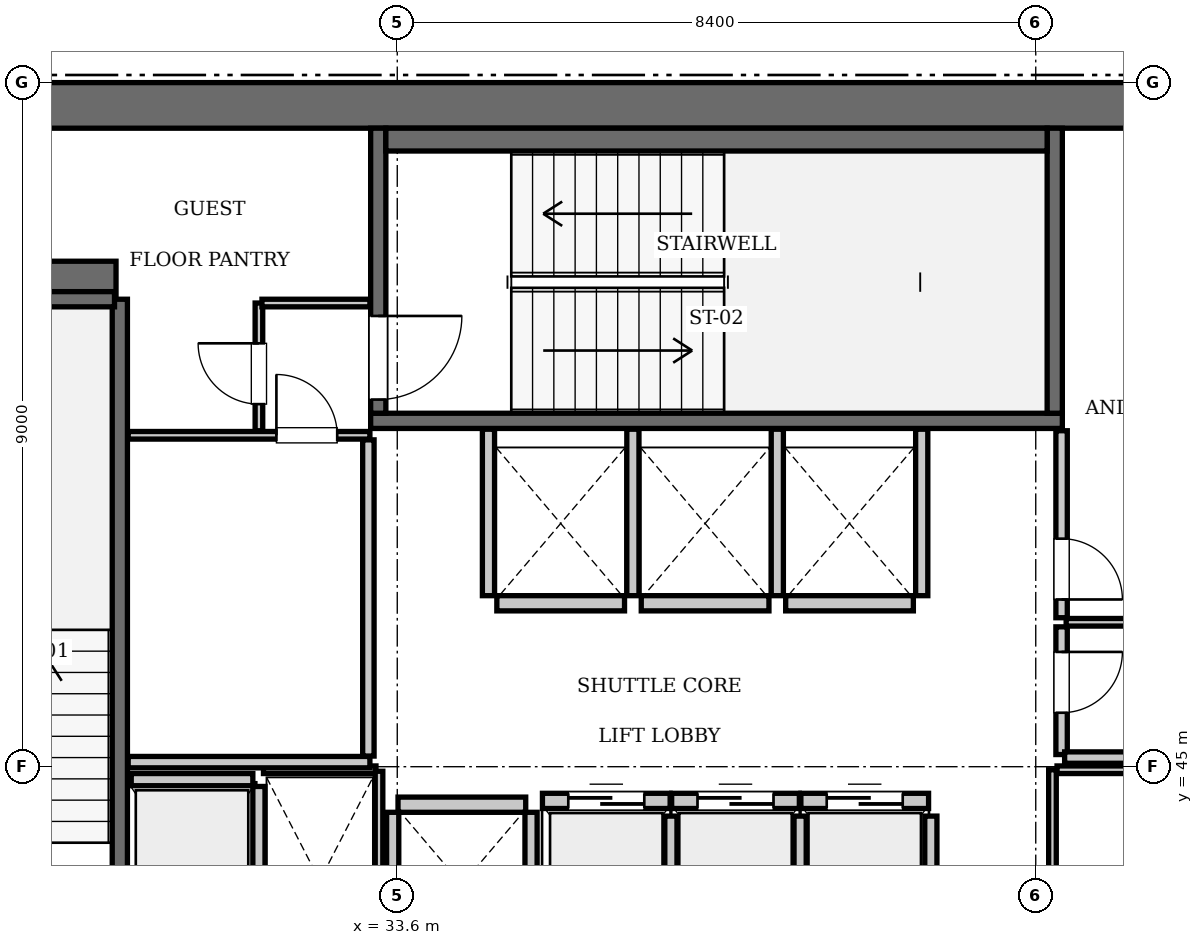
"""IFC4 building model, lengths in metres.
Left out: names, types, materials, properties, quantities, classifications, styles, units other than length and angle.
Written with IfcOpenShell. Run it as: python <this file> out.ifc"""

import sys

from ifc_helpers import new_model, si_unit, direction, frame, frame_2d, origin, place, context, subcontext, project, spatial, rectangle, extrude, element, fill, save


model = new_model("IFC4")
c1 = context("Model", 3, precision=1e-05, world=origin(), true_north=direction((0.0, 1.0)))
c2 = subcontext(c1, "Body", "Model", "MODEL_VIEW")
j1 = project(units=[si_unit("LENGTHUNIT", "METRE"), si_unit("PLANEANGLEUNIT", "RADIAN")], contexts=[c1])
p1 = place(None, origin())
s1 = spatial("IfcSite", under=j1, at=p1, CompositionType="ELEMENT")
p2 = place(p1, origin())
s2 = spatial("IfcBuilding", under=s1, at=p2, CompositionType="ELEMENT")
p3 = place(p2, frame((0.0, 0.0, 250.95)))
s3 = spatial("IfcBuildingStorey", under=s2, at=p3, CompositionType="ELEMENT", Elevation=250.95)
p4 = place(p3, frame((25.2, 53.7, 0.0), z_axis=(0.0, 0.0, 1.0), x_axis=(1.0, 0.0, 0.0)))
e1 = element("IfcWall", 1, at=p4, inside=s3, PredefinedType="SHEAR", context=c2, shape_type="SweptSolid", body=[
    extrude(rectangle(XDim=25.2, YDim=0.6, at=frame_2d((12.6, 0.0))), origin(), (0.0, 0.0, 1.0), 3.85),
])
p5 = place(p3, frame((25.8, 51.4, 0.0), z_axis=(0.0, 0.0, 1.0), x_axis=(1.0, 0.0, 0.0)))
e2 = element("IfcWall", 2, at=p5, inside=s3, PredefinedType="SHEAR", context=c2, shape_type="SweptSolid", body=[
    extrude(rectangle(XDim=4.1, YDim=0.5, at=frame_2d((2.05, 0.0))), origin(), (0.0, 0.0, 1.0), 3.85),
])
p6 = place(p3, frame((29.95, 42.0, 0.0), z_axis=(0.0, 0.0, 1.0), x_axis=(0.0, 1.0, 0.0)))
e3 = element("IfcWall", 3, at=p6, inside=s3, PredefinedType="SOLIDWALL", context=c2, shape_type="SweptSolid", body=[
    extrude(rectangle(XDim=9.15, YDim=0.2, at=frame_2d((4.575, 0.0))), origin(), (0.0, 0.0, 1.0), 3.61),
])
p7 = place(p3, frame((26.38, 51.15, 0.0), z_axis=(0.0, 0.0, 1.0), x_axis=(1.0, 0.0, 0.0)))
e4 = element("IfcWall", 4, at=p7, inside=s3, PredefinedType="SOLIDWALL", context=c2, shape_type="SweptSolid", body=[
    extrude(rectangle(XDim=3.5, YDim=0.2, at=frame_2d((1.75, 0.0))), origin(), (0.0, 0.0, 1.0), 3.61),
])
p8 = place(p3, frame((33.25, 49.55, 0.0), z_axis=(0.0, 0.0, 1.0), x_axis=(1.0, 0.0, 0.0)))
e5 = element("IfcWall", 5, at=p8, inside=s3, PredefinedType="SOLIDWALL", context=c2, shape_type="SweptSolid", body=[
    extrude(rectangle(XDim=9.1, YDim=0.2, at=frame_2d((4.55, 0.0))), origin(), (0.0, 0.0, 1.0), 3.61),
])
p9 = place(p3, frame((42.25, 49.65, 0.0), z_axis=(0.0, 0.0, 1.0), x_axis=(0.0, 1.0, 0.0)))
e6 = element("IfcWall", 6, at=p9, inside=s3, PredefinedType="SOLIDWALL", context=c2, shape_type="SweptSolid", body=[
    extrude(rectangle(XDim=3.75, YDim=0.2, at=frame_2d((1.875, 0.0))), origin(), (0.0, 0.0, 1.0), 3.61),
])
p10 = place(p3, frame((33.35, 49.65, 0.0), z_axis=(0.0, 0.0, 1.0), x_axis=(0.0, 1.0, 0.0)))
e7 = element("IfcWall", 7, at=p10, inside=s3, PredefinedType="SOLIDWALL", context=c2, shape_type="SweptSolid", body=[
    extrude(rectangle(XDim=3.75, YDim=0.2, at=frame_2d((1.875, 0.0))), origin(), (0.0, 0.0, 1.0), 3.61),
])
p11 = place(p10, frame((0.18, 0.0, 0.0)))
e8 = element("IfcOpeningElement", 8, at=p11, cuts=e7, PredefinedType="OPENING", context=c2, shape_type="SweptSolid", body=[
    extrude(rectangle(XDim=1.1, YDim=2.15, at=frame_2d((0.55, 1.075))), frame((0.0, 0.11, 0.0), z_axis=(0.0, -1.0, 0.0), x_axis=(1.0, 0.0, 0.0)), (0.0, 0.0, 1.0), 0.22),
])
p12 = place(p3, frame((33.45, 53.25, 0.0), z_axis=(0.0, 0.0, 1.0), x_axis=(1.0, 0.0, 0.0)))
e9 = element("IfcWall", 9, at=p12, inside=s3, PredefinedType="SOLIDWALL", context=c2, shape_type="SweptSolid", body=[
    extrude(rectangle(XDim=8.7, YDim=0.3, at=frame_2d((4.35, 0.0))), origin(), (0.0, 0.0, 1.0), 3.61),
])
p13 = place(p3, frame((35.51, 44.55, 0.0), z_axis=(0.0, 0.0, 1.0), x_axis=(1.0, 0.0, 0.0)))
e10 = element("IfcWall", 10, at=p13, inside=s3, PredefinedType="SOLIDWALL", context=c2, shape_type="SweptSolid", body=[
    extrude(rectangle(XDim=1.68, YDim=0.2, at=frame_2d((0.84, 0.0))), origin(), (0.0, 0.0, 1.0), 3.61),
])
p14 = place(p13, frame((0.34, 0.0, 0.0)))
e11 = element("IfcOpeningElement", 11, at=p14, cuts=e10, PredefinedType="OPENING", context=c2, shape_type="SweptSolid", body=[
    extrude(rectangle(XDim=1.0, YDim=2.15, at=frame_2d((0.5, 1.075))), frame((0.0, 0.11, 0.0), z_axis=(0.0, -1.0, 0.0), x_axis=(1.0, 0.0, 0.0)), (0.0, 0.0, 1.0), 0.22),
])
p15 = place(p3, frame((37.21, 44.55, 0.0), z_axis=(0.0, 0.0, 1.0), x_axis=(1.0, 0.0, 0.0)))
e12 = element("IfcWall", 12, at=p15, inside=s3, PredefinedType="SOLIDWALL", context=c2, shape_type="SweptSolid", body=[
    extrude(rectangle(XDim=1.68, YDim=0.2, at=frame_2d((0.84, 0.0))), origin(), (0.0, 0.0, 1.0), 3.61),
])
p16 = place(p15, frame((0.34, 0.0, 0.0)))
e13 = element("IfcOpeningElement", 13, at=p16, cuts=e12, PredefinedType="OPENING", context=c2, shape_type="SweptSolid", body=[
    extrude(rectangle(XDim=1.0, YDim=2.15, at=frame_2d((0.5, 1.075))), frame((0.0, 0.11, 0.0), z_axis=(0.0, -1.0, 0.0), x_axis=(1.0, 0.0, 0.0)), (0.0, 0.0, 1.0), 0.22),
])
p17 = place(p3, frame((38.91, 44.55, 0.0), z_axis=(0.0, 0.0, 1.0), x_axis=(1.0, 0.0, 0.0)))
e14 = element("IfcWall", 14, at=p17, inside=s3, PredefinedType="SOLIDWALL", context=c2, shape_type="SweptSolid", body=[
    extrude(rectangle(XDim=1.68, YDim=0.2, at=frame_2d((0.84, 0.0))), origin(), (0.0, 0.0, 1.0), 3.61),
])
p18 = place(p17, frame((0.34, 0.0, 0.0)))
e15 = element("IfcOpeningElement", 15, at=p18, cuts=e14, PredefinedType="OPENING", context=c2, shape_type="SweptSolid", body=[
    extrude(rectangle(XDim=1.0, YDim=2.15, at=frame_2d((0.5, 1.075))), frame((0.0, 0.11, 0.0), z_axis=(0.0, -1.0, 0.0), x_axis=(1.0, 0.0, 0.0)), (0.0, 0.0, 1.0), 0.22),
])
p19 = place(p3, frame((34.91, 47.15, 0.0), z_axis=(0.0, 0.0, 1.0), x_axis=(1.0, 0.0, 0.0)))
e16 = element("IfcWall", 16, at=p19, inside=s3, PredefinedType="SOLIDWALL", context=c2, shape_type="SweptSolid", body=[
    extrude(rectangle(XDim=1.68, YDim=0.2, at=frame_2d((0.84, 0.0))), origin(), (0.0, 0.0, 1.0), 3.61),
])
for number, where, z_axis, x_axis in (
    (17, (36.81, 47.15, 0.0), (0.0, 0.0, 1.0), (1.0, 0.0, 0.0)),
    (18, (38.71, 47.15, 0.0), (0.0, 0.0, 1.0), (1.0, 0.0, 0.0)),
    (19, (33.61, 44.5, 0.0), (0.0, 0.0, 1.0), (1.0, 0.0, 0.0)),
):
    element("IfcWall", number, at=place(p3, frame(where, z_axis=z_axis, x_axis=x_axis)), inside=s3, PredefinedType="SOLIDWALL", context=c2, shape_type="SweptSolid", body=[
        extrude(rectangle(XDim=1.68, YDim=0.2, at=frame_2d((0.84, 0.0))), origin(), (0.0, 0.0, 1.0), 3.61),
    ])
p20 = place(p3, frame((30.1, 44.83, 0.0), z_axis=(0.0, 0.0, 1.0), x_axis=(1.0, 0.0, 0.0)))
e20 = element("IfcWall", 20, at=p20, inside=s3, PredefinedType="SOLIDWALL", context=c2, shape_type="SweptSolid", body=[
    extrude(rectangle(XDim=1.6, YDim=0.16, at=frame_2d((0.8, 0.0))), origin(), (0.0, 0.0, 1.0), 3.61),
])
p21 = place(p3, frame((31.78, 42.0, 0.0), z_axis=(0.0, 0.0, 1.0), x_axis=(0.0, 1.0, 0.0)))
e21 = element("IfcWall", 21, at=p21, inside=s3, PredefinedType="SOLIDWALL", context=c2, shape_type="SweptSolid", body=[
    extrude(rectangle(XDim=2.74, YDim=0.16, at=frame_2d((1.37, 0.0))), origin(), (0.0, 0.0, 1.0), 3.61),
])
for number, where, z_axis, x_axis in (
    (22, (37.2, 42.0, 0.0), (0.0, 0.0, 1.0), (0.0, 1.0, 0.0)),
    (23, (38.9, 42.0, 0.0), (0.0, 0.0, 1.0), (0.0, 1.0, 0.0)),
    (24, (40.62, 42.0, 0.0), (0.0, 0.0, 1.0), (0.0, 1.0, 0.0)),
):
    element("IfcWall", number, at=place(p3, frame(where, z_axis=z_axis, x_axis=x_axis)), inside=s3, PredefinedType="SOLIDWALL", context=c2, shape_type="SweptSolid", body=[
        extrude(rectangle(XDim=2.35, YDim=0.16, at=frame_2d((1.175, 0.0))), origin(), (0.0, 0.0, 1.0), 3.61),
    ])
for number, where, z_axis, x_axis in (
    (25, (34.8, 47.25, 0.0), (0.0, 0.0, 1.0), (0.0, 1.0, 0.0)),
    (26, (36.7, 47.25, 0.0), (0.0, 0.0, 1.0), (0.0, 1.0, 0.0)),
    (27, (38.6, 47.25, 0.0), (0.0, 0.0, 1.0), (0.0, 1.0, 0.0)),
    (28, (40.5, 47.25, 0.0), (0.0, 0.0, 1.0), (0.0, 1.0, 0.0)),
):
    element("IfcWall", number, at=place(p3, frame(where, z_axis=z_axis, x_axis=x_axis)), inside=s3, PredefinedType="SOLIDWALL", context=c2, shape_type="SweptSolid", body=[
        extrude(rectangle(XDim=2.19, YDim=0.16, at=frame_2d((1.095, 0.0))), origin(), (0.0, 0.0, 1.0), 3.61),
    ])
for number, where, z_axis, x_axis in (
    (29, (33.54, 42.0, 0.0), (0.0, 0.0, 1.0), (0.0, 1.0, 0.0)),
    (30, (35.36, 42.0, 0.0), (0.0, 0.0, 1.0), (0.0, 1.0, 0.0)),
):
    element("IfcWall", number, at=place(p3, frame(where, z_axis=z_axis, x_axis=x_axis)), inside=s3, PredefinedType="SOLIDWALL", context=c2, shape_type="SweptSolid", body=[
        extrude(rectangle(XDim=2.4, YDim=0.16, at=frame_2d((1.2, 0.0))), origin(), (0.0, 0.0, 1.0), 3.61),
    ])
p22 = place(p3, frame((31.84, 44.96, 0.0), z_axis=(0.0, 0.0, 1.0), x_axis=(1.0, 0.0, 0.0)))
e31 = element("IfcWall", 31, at=p22, inside=s3, PredefinedType="PARTITIONING", context=c2, shape_type="SweptSolid", body=[
    extrude(rectangle(XDim=1.48, YDim=0.1, at=frame_2d((0.74, 0.0))), origin(), (0.0, 0.0, 1.0), 3.61),
])
p23 = place(p3, frame((33.36, 42.06, 0.0), z_axis=(0.0, 0.0, 1.0), x_axis=(0.0, 1.0, 0.0)))
e32 = element("IfcWall", 32, at=p23, inside=s3, PredefinedType="PARTITIONING", context=c2, shape_type="SweptSolid", body=[
    extrude(rectangle(XDim=2.88, YDim=0.1, at=frame_2d((1.44, 0.0))), origin(), (0.0, 0.0, 1.0), 3.61),
])
p24 = place(p3, frame((42.22, 42.05, 0.0), z_axis=(0.0, 0.0, 1.0), x_axis=(0.0, 1.0, 0.0)))
e33 = element("IfcWall", 33, at=p24, inside=s3, PredefinedType="PARTITIONING", context=c2, shape_type="SweptSolid", body=[
    extrude(rectangle(XDim=2.91, YDim=0.1, at=frame_2d((1.455, 0.0))), origin(), (0.0, 0.0, 1.0), 3.61),
])
p25 = place(p24, frame((0.65, 0.0, 0.0)))
e34 = element("IfcOpeningElement", 34, at=p25, cuts=e33, PredefinedType="OPENING", context=c2, shape_type="SweptSolid", body=[
    extrude(rectangle(XDim=0.8, YDim=2.05, at=frame_2d((0.4, 1.025))), frame((0.0, 0.06, 0.0), z_axis=(0.0, -1.0, 0.0), x_axis=(1.0, 0.0, 0.0)), (0.0, 0.0, 1.0), 0.12),
])
p26 = place(p3, frame((42.28, 44.96, 0.0), z_axis=(0.0, 0.0, 1.0), x_axis=(1.0, 0.0, 0.0)))
e35 = element("IfcWall", 35, at=p26, inside=s3, PredefinedType="PARTITIONING", context=c2, shape_type="SweptSolid", body=[
    extrude(rectangle(XDim=1.3, YDim=0.1, at=frame_2d((0.65, 0.0))), origin(), (0.0, 0.0, 1.0), 3.61),
])
p27 = place(p3, frame((30.06, 45.06, 0.0), z_axis=(0.0, 0.0, 1.0), x_axis=(1.0, 0.0, 0.0)))
e36 = element("IfcWall", 36, at=p27, inside=s3, PredefinedType="PARTITIONING", context=c2, shape_type="SweptSolid", body=[
    extrude(rectangle(XDim=3.18, YDim=0.15, at=frame_2d((1.59, 0.0))), origin(), (0.0, 0.0, 1.0), 3.61),
])
p28 = place(p3, frame((33.22, 45.14, 0.0), z_axis=(0.0, 0.0, 1.0), x_axis=(0.0, 1.0, 0.0)))
e37 = element("IfcWall", 37, at=p28, inside=s3, PredefinedType="PARTITIONING", context=c2, shape_type="SweptSolid", body=[
    extrude(rectangle(XDim=4.16, YDim=0.15, at=frame_2d((2.08, 0.0))), origin(), (0.0, 0.0, 1.0), 3.61),
])
p29 = place(p3, frame((30.06, 49.36, 0.0), z_axis=(0.0, 0.0, 1.0), x_axis=(1.0, 0.0, 0.0)))
e38 = element("IfcWall", 38, at=p29, inside=s3, PredefinedType="PARTITIONING", context=c2, shape_type="SweptSolid", body=[
    extrude(rectangle(XDim=3.18, YDim=0.1, at=frame_2d((1.59, 0.0))), origin(), (0.0, 0.0, 1.0), 3.61),
])
p30 = place(p29, frame((1.95, 0.0, 0.0)))
e39 = element("IfcOpeningElement", 39, at=p30, cuts=e38, PredefinedType="OPENING", context=c2, shape_type="SweptSolid", body=[
    extrude(rectangle(XDim=0.8, YDim=2.05, at=frame_2d((0.4, 1.025))), frame((0.0, 0.06, 0.0), z_axis=(0.0, -1.0, 0.0), x_axis=(1.0, 0.0, 0.0)), (0.0, 0.0, 1.0), 0.12),
])
p31 = place(p3, frame((31.78, 49.42, 0.0), z_axis=(0.0, 0.0, 1.0), x_axis=(0.0, 1.0, 0.0)))
e40 = element("IfcWall", 40, at=p31, inside=s3, PredefinedType="PARTITIONING", context=c2, shape_type="SweptSolid", body=[
    extrude(rectangle(XDim=1.68, YDim=0.1, at=frame_2d((0.84, 0.0))), origin(), (0.0, 0.0, 1.0), 3.61),
])
p32 = place(p31, frame((0.35, 0.0, 0.0)))
e41 = element("IfcOpeningElement", 41, at=p32, cuts=e40, PredefinedType="OPENING", context=c2, shape_type="SweptSolid", body=[
    extrude(rectangle(XDim=0.8, YDim=2.05, at=frame_2d((0.4, 1.025))), frame((0.0, 0.06, 0.0), z_axis=(0.0, -1.0, 0.0), x_axis=(1.0, 0.0, 0.0)), (0.0, 0.0, 1.0), 0.12),
])
p33 = place(p3, frame((31.82, 51.1, 0.0), z_axis=(0.0, 0.0, 1.0), x_axis=(1.0, 0.0, 0.0)))
e42 = element("IfcWall", 42, at=p33, inside=s3, PredefinedType="PARTITIONING", context=c2, shape_type="SweptSolid", body=[
    extrude(rectangle(XDim=1.42, YDim=0.1, at=frame_2d((0.71, 0.0))), origin(), (0.0, 0.0, 1.0), 3.61),
])
p34 = place(p3, frame((42.34, 45.16, 0.0), z_axis=(0.0, 0.0, 1.0), x_axis=(0.0, 1.0, 0.0)))
e43 = element("IfcWall", 43, at=p34, inside=s3, PredefinedType="PARTITIONING", context=c2, shape_type="SweptSolid", body=[
    extrude(rectangle(XDim=1.68, YDim=0.15, at=frame_2d((0.84, 0.0))), origin(), (0.0, 0.0, 1.0), 3.61),
])
p35 = place(p34, frame((0.55, 0.0, 0.0)))
e44 = element("IfcOpeningElement", 44, at=p35, cuts=e43, PredefinedType="OPENING", context=c2, shape_type="SweptSolid", body=[
    extrude(rectangle(XDim=0.8, YDim=2.05, at=frame_2d((0.4, 1.025))), frame((0.0, 0.085, 0.0), z_axis=(0.0, -1.0, 0.0), x_axis=(1.0, 0.0, 0.0)), (0.0, 0.0, 1.0), 0.17),
])
p36 = place(p3, frame((42.34, 46.96, 0.0), z_axis=(0.0, 0.0, 1.0), x_axis=(0.0, 1.0, 0.0)))
e45 = element("IfcWall", 45, at=p36, inside=s3, PredefinedType="PARTITIONING", context=c2, shape_type="SweptSolid", body=[
    extrude(rectangle(XDim=2.46, YDim=0.15, at=frame_2d((1.23, 0.0))), origin(), (0.0, 0.0, 1.0), 3.61),
])
p37 = place(p36, frame((0.24, 0.0, 0.0)))
e46 = element("IfcOpeningElement", 46, at=p37, cuts=e45, PredefinedType="OPENING", context=c2, shape_type="SweptSolid", body=[
    extrude(rectangle(XDim=0.8, YDim=2.05, at=frame_2d((0.4, 1.025))), frame((0.0, 0.085, 0.0), z_axis=(0.0, -1.0, 0.0), x_axis=(1.0, 0.0, 0.0)), (0.0, 0.0, 1.0), 0.17),
])
p38 = place(p3, frame((42.4, 46.9, 0.0), z_axis=(0.0, 0.0, 1.0), x_axis=(1.0, 0.0, 0.0)))
e47 = element("IfcWall", 47, at=p38, inside=s3, PredefinedType="PARTITIONING", context=c2, shape_type="SweptSolid", body=[
    extrude(rectangle(XDim=3.1, YDim=0.1, at=frame_2d((1.55, 0.0))), origin(), (0.0, 0.0, 1.0), 3.61),
])
p39 = place(p3, frame((42.38, 45.12, 0.0), z_axis=(0.0, 0.0, 1.0), x_axis=(1.0, 0.0, 0.0)))
e48 = element("IfcWall", 48, at=p39, inside=s3, PredefinedType="PARTITIONING", context=c2, shape_type="SweptSolid", body=[
    extrude(rectangle(XDim=3.14, YDim=0.15, at=frame_2d((1.57, 0.0))), origin(), (0.0, 0.0, 1.0), 3.61),
])
p40 = place(p11, frame((1.1, 0.0, 0.0), z_axis=(0.0, 0.0, 1.0), x_axis=(-1.0, 0.0, 0.0)))
e49 = element("IfcDoor", 49, at=p40, inside=s3, OperationType="SINGLE_SWING_LEFT", PredefinedType="DOOR", context=c2, shape_type="SweptSolid", body=[
    extrude(rectangle(XDim=1.1, YDim=2.15, at=frame_2d((0.55, 1.075))), frame((0.0, 0.025, 0.0), z_axis=(0.0, -1.0, 0.0), x_axis=(1.0, 0.0, 0.0)), (0.0, 0.0, 1.0), 0.05),
])
fill(e8, e49)
p41 = place(p14, origin())
e50 = element("IfcDoor", 50, at=p41, inside=s3, OperationType="SLIDING_TO_LEFT", PredefinedType="DOOR", context=c2, shape_type="SweptSolid", body=[
    extrude(rectangle(XDim=1.0, YDim=2.15, at=frame_2d((0.5, 1.075))), frame((0.0, 0.025, 0.0), z_axis=(0.0, -1.0, 0.0), x_axis=(1.0, 0.0, 0.0)), (0.0, 0.0, 1.0), 0.05),
])
fill(e11, e50)
p42 = place(p16, origin())
e51 = element("IfcDoor", 51, at=p42, inside=s3, OperationType="SLIDING_TO_LEFT", PredefinedType="DOOR", context=c2, shape_type="SweptSolid", body=[
    extrude(rectangle(XDim=1.0, YDim=2.15, at=frame_2d((0.5, 1.075))), frame((0.0, 0.025, 0.0), z_axis=(0.0, -1.0, 0.0), x_axis=(1.0, 0.0, 0.0)), (0.0, 0.0, 1.0), 0.05),
])
fill(e13, e51)
p43 = place(p18, origin())
e52 = element("IfcDoor", 52, at=p43, inside=s3, OperationType="SLIDING_TO_LEFT", PredefinedType="DOOR", context=c2, shape_type="SweptSolid", body=[
    extrude(rectangle(XDim=1.0, YDim=2.15, at=frame_2d((0.5, 1.075))), frame((0.0, 0.025, 0.0), z_axis=(0.0, -1.0, 0.0), x_axis=(1.0, 0.0, 0.0)), (0.0, 0.0, 1.0), 0.05),
])
fill(e15, e52)
p44 = place(p30, origin())
e53 = element("IfcDoor", 53, at=p44, inside=s3, OperationType="SINGLE_SWING_LEFT", PredefinedType="DOOR", context=c2, shape_type="SweptSolid", body=[
    extrude(rectangle(XDim=0.8, YDim=2.05, at=frame_2d((0.4, 1.025))), frame((0.0, 0.025, 0.0), z_axis=(0.0, -1.0, 0.0), x_axis=(1.0, 0.0, 0.0)), (0.0, 0.0, 1.0), 0.05),
])
fill(e39, e53)
p45 = place(p32, origin())
e54 = element("IfcDoor", 54, at=p45, inside=s3, OperationType="SINGLE_SWING_RIGHT", PredefinedType="DOOR", context=c2, shape_type="SweptSolid", body=[
    extrude(rectangle(XDim=0.8, YDim=2.05, at=frame_2d((0.4, 1.025))), frame((0.0, 0.025, 0.0), z_axis=(0.0, -1.0, 0.0), x_axis=(1.0, 0.0, 0.0)), (0.0, 0.0, 1.0), 0.05),
])
fill(e41, e54)
p46 = place(p35, frame((0.8, 0.0, 0.0), z_axis=(0.0, 0.0, 1.0), x_axis=(-1.0, 0.0, 0.0)))
e55 = element("IfcDoor", 55, at=p46, inside=s3, OperationType="SINGLE_SWING_LEFT", PredefinedType="DOOR", context=c2, shape_type="SweptSolid", body=[
    extrude(rectangle(XDim=0.8, YDim=2.05, at=frame_2d((0.4, 1.025))), frame((0.0, 0.025, 0.0), z_axis=(0.0, -1.0, 0.0), x_axis=(1.0, 0.0, 0.0)), (0.0, 0.0, 1.0), 0.05),
])
fill(e44, e55)
p47 = place(p37, frame((0.8, 0.0, 0.0), z_axis=(0.0, 0.0, 1.0), x_axis=(-1.0, 0.0, 0.0)))
e56 = element("IfcDoor", 56, at=p47, inside=s3, OperationType="SINGLE_SWING_RIGHT", PredefinedType="DOOR", context=c2, shape_type="SweptSolid", body=[
    extrude(rectangle(XDim=0.8, YDim=2.05, at=frame_2d((0.4, 1.025))), frame((0.0, 0.025, 0.0), z_axis=(0.0, -1.0, 0.0), x_axis=(1.0, 0.0, 0.0)), (0.0, 0.0, 1.0), 0.05),
])
fill(e46, e56)
save(model, sys.argv[1])
